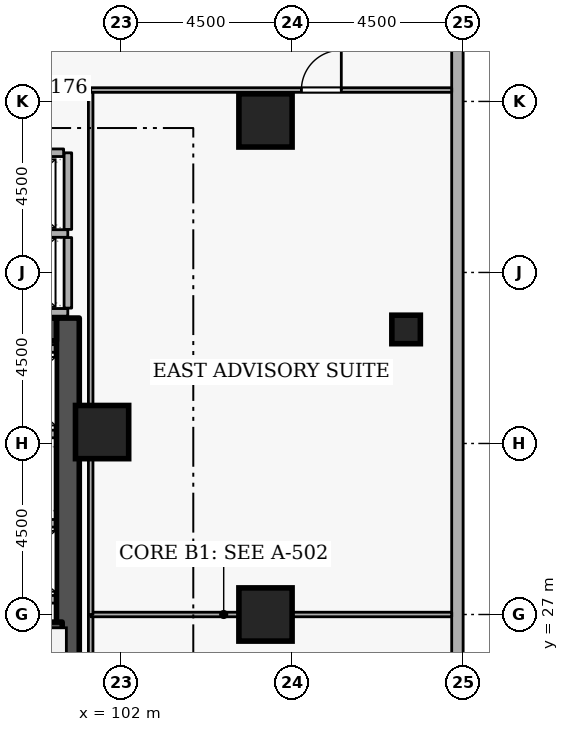
"""IFC4 building model, lengths in metres.
Left out: names, types, materials, properties, quantities, classifications, styles, units other than length and angle.
Written with IfcOpenShell. Run it as: python <this file> out.ifc"""

import sys

from ifc_helpers import new_model, si_unit, direction, frame, frame_2d, origin, origin_2d, place, context, subcontext, project, spatial, rectangle, extrude, element, fill, save


model = new_model("IFC4")
c1 = context("Model", 3, precision=1e-05, world=origin(), true_north=direction((0.0, 1.0)))
c2 = subcontext(c1, "Body", "Model", "MODEL_VIEW")
j1 = project(units=[si_unit("LENGTHUNIT", "METRE"), si_unit("PLANEANGLEUNIT", "RADIAN")], contexts=[c1])
p1 = place(None, origin())
s1 = spatial("IfcSite", under=j1, at=p1, CompositionType="ELEMENT")
p2 = place(p1, origin())
s2 = spatial("IfcBuilding", under=s1, at=p2, CompositionType="ELEMENT")
p3 = place(p2, frame((0.0, 0.0, 9.6)))
s3 = spatial("IfcBuildingStorey", under=s2, at=p3, CompositionType="ELEMENT", Elevation=9.6)
p4 = place(p3, frame((100.6, 19.2, 0.0), z_axis=(0.0, 0.0, 1.0), x_axis=(0.0, 1.0, 0.0)))
e1 = element("IfcWall", 1, at=p4, inside=s3, PredefinedType="SHEAR", context=c2, shape_type="SweptSolid", body=[
    extrude(rectangle(XDim=15.6, YDim=0.6, at=frame_2d((7.8, 0.0))), origin(), (0.0, 0.0, 1.0), 4.5),
])
p5 = place(p3, frame((94.6, 34.5, 0.0), z_axis=(0.0, 0.0, 1.0), x_axis=(1.0, 0.0, 0.0)))
e2 = element("IfcWall", 2, at=p5, inside=s3, PredefinedType="SHEAR", context=c2, shape_type="SweptSolid", body=[
    extrude(rectangle(XDim=5.7, YDim=0.6, at=frame_2d((2.85, 0.0))), origin(), (0.0, 0.0, 1.0), 4.5),
])
for number, where, z_axis, x_axis in (
    (3, (105.8, 27.0, 0.0), (0.0, 0.0, 1.0), (1.0, 0.0, 0.0)),
    (4, (105.8, 40.0, 0.0), (0.0, 0.0, 1.0), (1.0, 0.0, 0.0)),
    (5, (101.5, 31.8, 0.0), (0.0, 0.0, 1.0), (1.0, 0.0, 0.0)),
):
    element("IfcColumn", number, at=place(p3, frame(where, z_axis=z_axis, x_axis=x_axis)), inside=s3, PredefinedType="COLUMN", context=c2, shape_type="SweptSolid", body=[
        extrude(rectangle(XDim=1.4, YDim=1.4, at=origin_2d()), origin(), (0.0, 0.0, 1.0), 4.5),
    ])
p6 = place(p3, frame((109.5, 34.5, 0.0), z_axis=(0.0, 0.0, 1.0), x_axis=(1.0, 0.0, 0.0)))
e6 = element("IfcColumn", 6, at=p6, inside=s3, PredefinedType="COLUMN", context=c2, shape_type="SweptSolid", body=[
    extrude(rectangle(XDim=0.75, YDim=0.75, at=origin_2d()), origin(), (0.0, 0.0, 1.0), 4.5),
])
p7 = place(p3, frame((110.85, 7.82, 0.0), z_axis=(0.0, 0.0, 1.0), x_axis=(0.0, 1.0, 0.0)))
e7 = element("IfcWall", 7, at=p7, inside=s3, PredefinedType="STANDARD", context=c2, shape_type="SweptSolid", body=[
    extrude(rectangle(XDim=41.36, YDim=0.3, at=frame_2d((20.68, 0.0))), origin(), (0.0, 0.0, 1.0), 3.56),
])
for number, where, z_axis, x_axis in (
    (8, (97.852, 29.4, 0.0), (0.0, 0.0, 1.0), (1.0, 0.0, 0.0)),
    (9, (97.852, 27.4, 0.0), (0.0, 0.0, 1.0), (1.0, 0.0, 0.0)),
    (10, (97.852, 31.75, 0.0), (0.0, 0.0, 1.0), (1.0, 0.0, 0.0)),
    (11, (97.852, 34.0, 0.0), (0.0, 0.0, 1.0), (1.0, 0.0, 0.0)),
):
    element("IfcWall", number, at=place(p3, frame(where, z_axis=z_axis, x_axis=x_axis)), inside=s3, PredefinedType="STANDARD", context=c2, shape_type="SweptSolid", body=[
        extrude(rectangle(XDim=2.436, YDim=0.2, at=frame_2d((1.218, 0.0))), origin(), (0.0, 0.0, 1.0), 4.16),
    ])
for number, where, z_axis, x_axis in (
    (12, (97.852, 37.025, 0.0), (0.0, 0.0, 1.0), (1.0, 0.0, 0.0)),
    (13, (97.852, 34.95, 0.0), (0.0, 0.0, 1.0), (1.0, 0.0, 0.0)),
):
    element("IfcWall", number, at=place(p3, frame(where, z_axis=z_axis, x_axis=x_axis)), inside=s3, PredefinedType="STANDARD", context=c2, shape_type="SweptSolid", body=[
        extrude(rectangle(XDim=2.746, YDim=0.2, at=frame_2d((1.373, 0.0))), origin(), (0.0, 0.0, 1.0), 4.16),
    ])
p8 = place(p3, frame((100.6, 35.062, 0.0), z_axis=(0.0, 0.0, 1.0), x_axis=(0.0, 1.0, 0.0)))
e14 = element("IfcWall", 14, at=p8, inside=s3, PredefinedType="STANDARD", context=c2, shape_type="SweptSolid", body=[
    extrude(rectangle(XDim=1.856, YDim=0.2, at=frame_2d((0.928, 0.0))), origin(), (0.0, 0.0, 1.0), 4.16),
])
p9 = place(p3, frame((100.6, 37.132, 0.0), z_axis=(0.0, 0.0, 1.0), x_axis=(0.0, 1.0, 0.0)))
e15 = element("IfcWall", 15, at=p9, inside=s3, PredefinedType="STANDARD", context=c2, shape_type="SweptSolid", body=[
    extrude(rectangle(XDim=2.016, YDim=0.2, at=frame_2d((1.008, 0.0))), origin(), (0.0, 0.0, 1.0), 4.16),
])
p10 = place(p3, frame((97.852, 39.15, 0.0), z_axis=(0.0, 0.0, 1.0), x_axis=(1.0, 0.0, 0.0)))
e16 = element("IfcWall", 16, at=p10, inside=s3, PredefinedType="STANDARD", context=c2, shape_type="SweptSolid", body=[
    extrude(rectangle(XDim=2.636, YDim=0.2, at=frame_2d((1.318, 0.0))), origin(), (0.0, 0.0, 1.0), 4.16),
])
p11 = place(p3, frame((97.1, 26.7, 0.0), z_axis=(0.0, 0.0, 1.0), x_axis=(1.0, 0.0, 0.0)))
e17 = element("IfcWall", 17, at=p11, inside=s3, PredefinedType="SHEAR", context=c2, shape_type="SweptSolid", body=[
    extrude(rectangle(XDim=3.35, YDim=0.2, at=frame_2d((1.675, 0.0))), origin(), (0.0, 0.0, 1.0), 4.5),
])
p12 = place(p3, frame((101.2, 16.65, 0.0), z_axis=(0.0, 0.0, 1.0), x_axis=(0.0, 1.0, 0.0)))
e18 = element("IfcWall", 18, at=p12, inside=s3, PredefinedType="PARTITIONING", context=c2, shape_type="SweptSolid", body=[
    extrude(rectangle(XDim=10.35, YDim=0.12, at=frame_2d((5.175, 0.0))), origin(), (0.0, 0.0, 1.0), 4.16),
])
p13 = place(p3, frame((101.2, 27.0, 0.0), z_axis=(0.0, 0.0, 1.0), x_axis=(1.0, 0.0, 0.0)))
e19 = element("IfcWall", 19, at=p13, inside=s3, PredefinedType="PARTITIONING", context=c2, shape_type="SweptSolid", body=[
    extrude(rectangle(XDim=9.5, YDim=0.12, at=frame_2d((4.75, 0.0))), origin(), (0.0, 0.0, 1.0), 4.16),
])
p14 = place(p3, frame((101.2, 27.0, 0.0), z_axis=(0.0, 0.0, 1.0), x_axis=(0.0, 1.0, 0.0)))
e20 = element("IfcWall", 20, at=p14, inside=s3, PredefinedType="PARTITIONING", context=c2, shape_type="SweptSolid", body=[
    extrude(rectangle(XDim=13.8, YDim=0.12, at=frame_2d((6.9, 0.0))), origin(), (0.0, 0.0, 1.0), 4.16),
])
p15 = place(p3, frame((101.2, 40.8, 0.0), z_axis=(0.0, 0.0, 1.0), x_axis=(1.0, 0.0, 0.0)))
e21 = element("IfcWall", 21, at=p15, inside=s3, PredefinedType="PARTITIONING", context=c2, shape_type="SweptSolid", body=[
    extrude(rectangle(XDim=9.5, YDim=0.12, at=frame_2d((4.75, 0.0))), origin(), (0.0, 0.0, 1.0), 4.16),
])
p16 = place(p15, frame((5.545, 0.0, 0.0)))
e22 = element("IfcOpeningElement", 22, at=p16, cuts=e21, PredefinedType="OPENING", context=c2, shape_type="SweptSolid", body=[
    extrude(rectangle(XDim=1.05, YDim=2.1, at=frame_2d((0.525, 1.05))), frame((0.0, 0.07, 0.0), z_axis=(0.0, -1.0, 0.0), x_axis=(1.0, 0.0, 0.0)), (0.0, 0.0, 1.0), 0.14),
])
p17 = place(p16, origin())
e23 = element("IfcDoor", 23, at=p17, inside=s3, OperationType="SINGLE_SWING_RIGHT", PredefinedType="DOOR", context=c2, shape_type="SweptSolid", body=[
    extrude(rectangle(XDim=1.05, YDim=2.1, at=frame_2d((0.525, 1.05))), frame((0.0, 0.025, 0.0), z_axis=(0.0, -1.0, 0.0), x_axis=(1.0, 0.0, 0.0)), (0.0, 0.0, 1.0), 0.05),
])
fill(e22, e23)
save(model, sys.argv[1])
